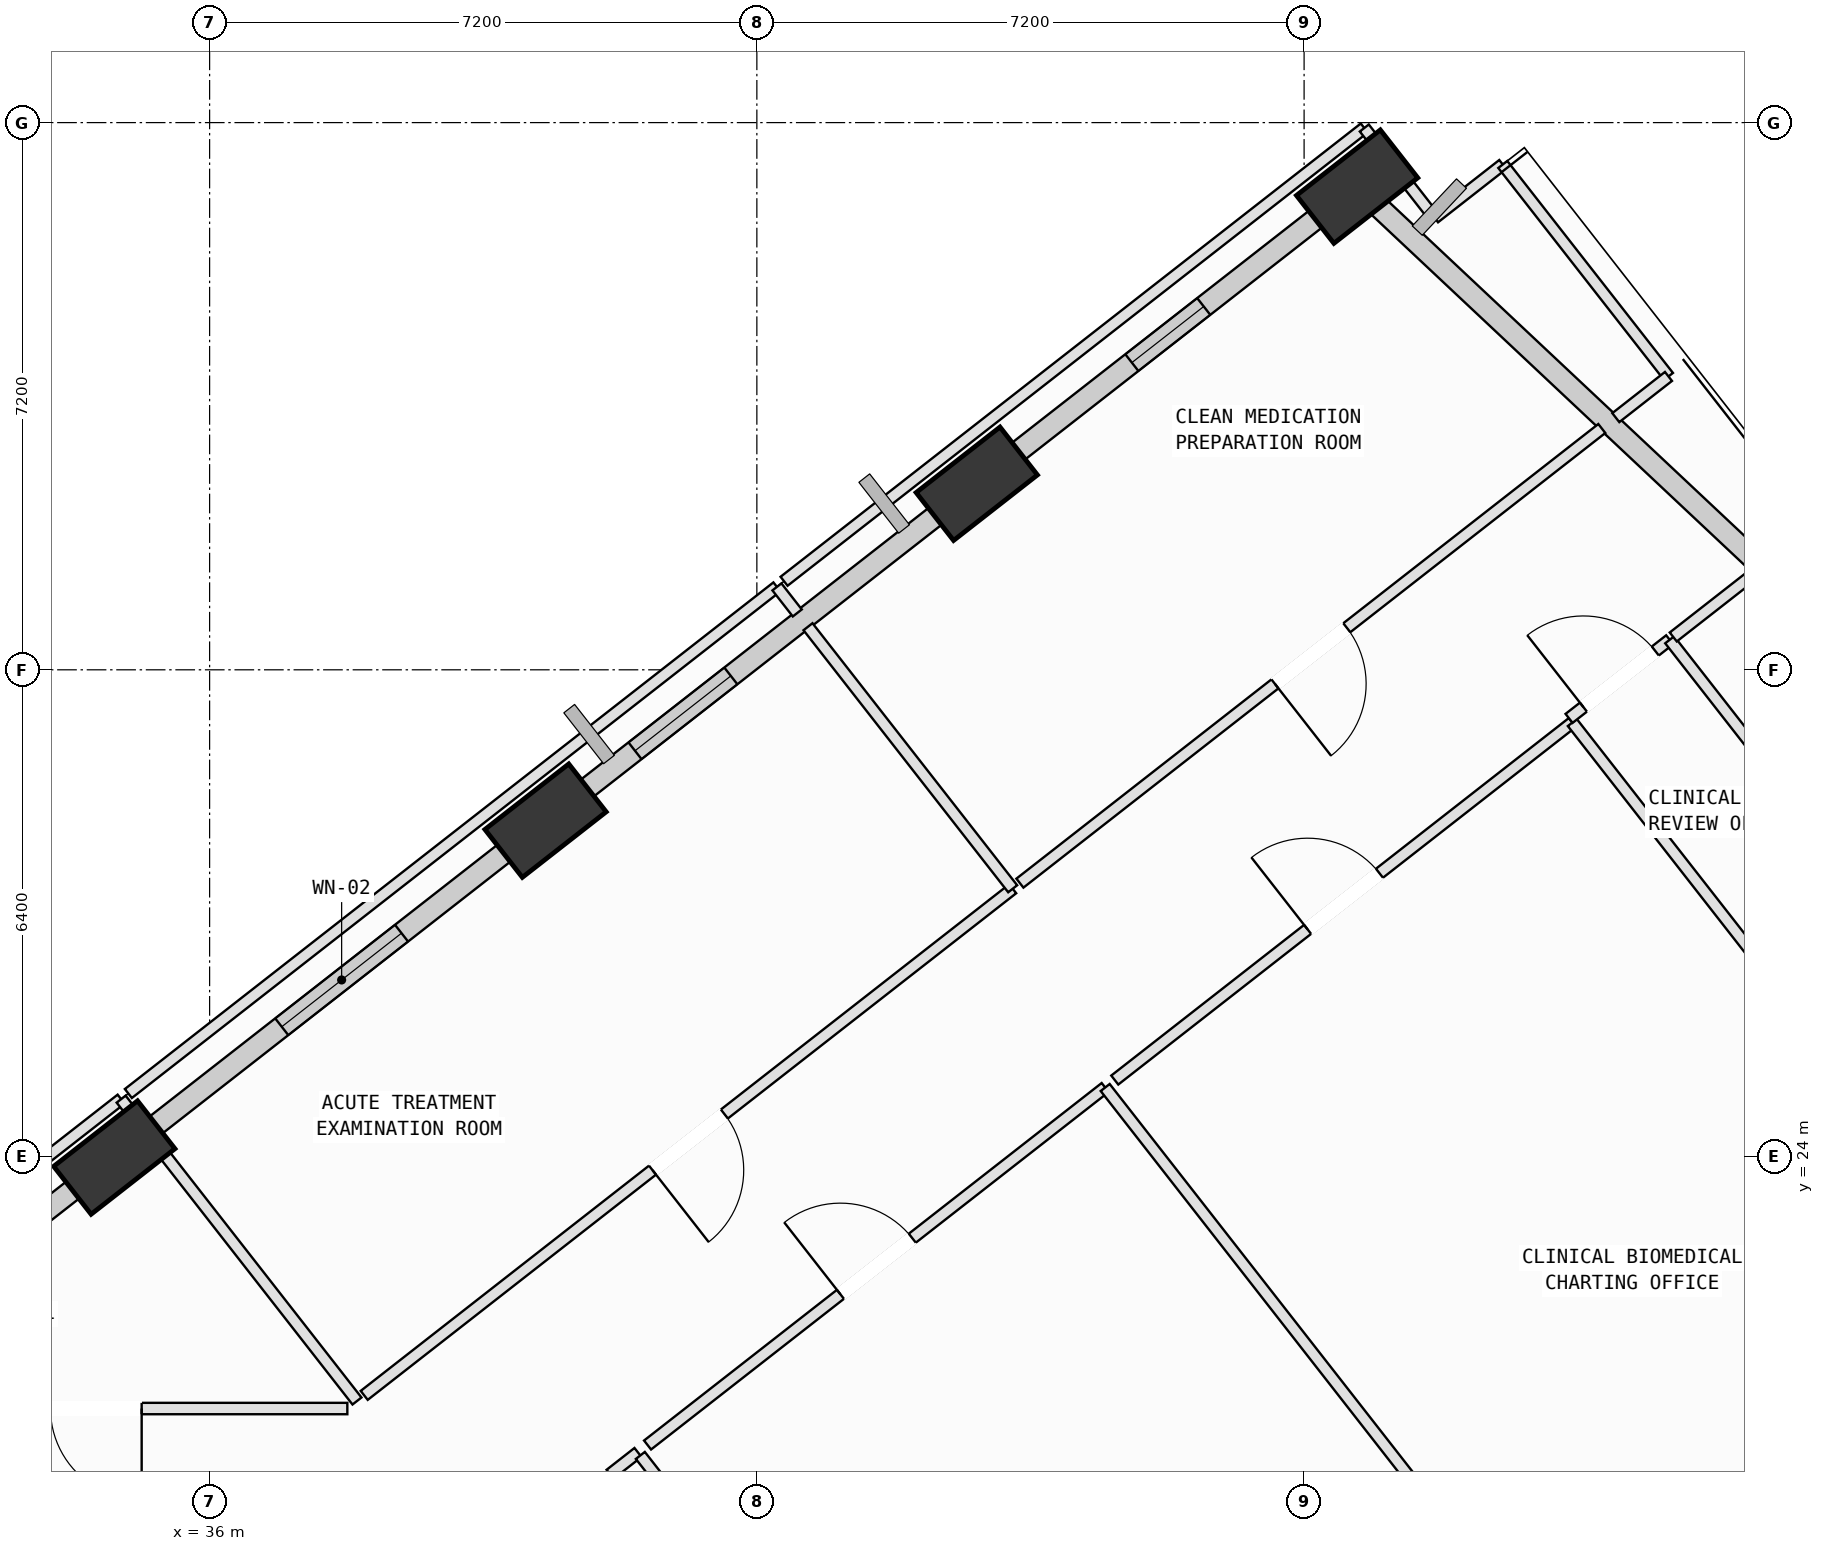
"""IFC4 building model, lengths in metres.
Left out: names, types, materials, properties, quantities, classifications, styles, units other than length and angle.
Written with IfcOpenShell. Run it as: python <this file> out.ifc"""

import sys

from ifc_helpers import new_model, si_unit, direction, frame, frame_2d, origin, origin_2d, place, context, subcontext, project, spatial, rectangle, extrude, element, fill, save


model = new_model("IFC4")
c1 = context("Model", 3, precision=1e-05, world=origin(), true_north=direction((0.0, 1.0)))
c2 = subcontext(c1, "Body", "Model", "MODEL_VIEW")
j1 = project(units=[si_unit("LENGTHUNIT", "METRE"), si_unit("PLANEANGLEUNIT", "RADIAN")], contexts=[c1])
p1 = place(None, origin())
s1 = spatial("IfcSite", under=j1, at=p1, CompositionType="ELEMENT")
p2 = place(p1, origin())
s2 = spatial("IfcBuilding", under=s1, at=p2, CompositionType="ELEMENT")
p3 = place(p2, frame((0.0, 0.0, 185.8)))
s3 = spatial("IfcBuildingStorey", under=s2, at=p3, CompositionType="ELEMENT", Elevation=185.8)
p4 = place(p3, frame((51.097, 36.758, 0.002), z_axis=(-0.049963487917, 0.071811103218, 0.99616605811), x_axis=(-0.296576647091, -0.953489085694, 0.05385959398)))
e1 = element("IfcColumn", 1, at=p4, inside=s3, PredefinedType="COLUMN", context=c2, shape_type="SweptSolid", body=[
    extrude(rectangle(XDim=1.4, YDim=0.8, at=origin_2d()), origin(), (0.0, 0.0, 1.0), 4.012),
])
p5 = place(p3, frame((46.094, 32.848, 0.002), z_axis=(-0.033780379415, 0.051402274092, 0.998106553523), x_axis=(-0.321055026499, -0.946303148336, 0.037868475128)))
e2 = element("IfcColumn", 2, at=p5, inside=s3, PredefinedType="COLUMN", context=c2, shape_type="SweptSolid", body=[
    extrude(rectangle(XDim=1.4, YDim=0.8, at=origin_2d()), origin(), (0.0, 0.0, 1.0), 4.004),
])
p6 = place(p3, frame((40.42, 28.415, 0.002), z_axis=(-0.01520389404, 0.02814857491, 0.999488118657), x_axis=(-0.400901487538, -0.91590941177, 0.019696363152)))
e3 = element("IfcColumn", 3, at=p6, inside=s3, PredefinedType="COLUMN", context=c2, shape_type="SweptSolid", body=[
    extrude(rectangle(XDim=1.4, YDim=0.8, at=origin_2d()), origin(), (0.0, 0.0, 1.0), 3.998),
])
p7 = place(p3, frame((34.746, 23.982, 0.002), z_axis=(0.003359952663, 0.004765023776, 0.999983002489), x_axis=(-0.99879049006, -0.049037451332, 0.003589614403)))
e4 = element("IfcColumn", 4, at=p7, inside=s3, PredefinedType="COLUMN", context=c2, shape_type="SweptSolid", body=[
    extrude(rectangle(XDim=1.4, YDim=0.8, at=origin_2d()), origin(), (0.0, 0.0, 1.0), 3.996),
])
p8 = place(p3, frame((51.333, 36.536, 0.0), z_axis=(0.0, 0.0, 1.0), x_axis=(0.728847654356, -0.684675906353, 0.0)))
e5 = element("IfcWall", 5, at=p8, inside=s3, PredefinedType="SOLIDWALL", context=c2, shape_type="SweptSolid", body=[
    extrude(rectangle(XDim=8.838, YDim=0.28, at=frame_2d((4.419, 0.0))), origin(), (0.0, 0.0, 1.0), 3.265),
])
p9 = place(p3, frame((46.481, 33.15, 0.0), z_axis=(0.0, 0.0, 1.0), x_axis=(0.788005197238, 0.615668587087, 0.0)))
e6 = element("IfcWall", 6, at=p9, inside=s3, PredefinedType="SOLIDWALL", context=c2, shape_type="SweptSolid", body=[
    extrude(rectangle(XDim=5.405, YDim=0.28, at=frame_2d((2.702, 0.0))), origin(), (0.0, 0.0, 1.0), 3.265),
])
p10 = place(p9, frame((2.098, 0.0, 0.75)))
e7 = element("IfcOpeningElement", 7, at=p10, cuts=e6, PredefinedType="OPENING", context=c2, shape_type="SweptSolid", body=[
    extrude(rectangle(XDim=1.2, YDim=1.75, at=frame_2d((0.6, 0.875))), frame((0.0, 0.15, 0.0), z_axis=(0.0, -1.0, 0.0), x_axis=(1.0, 0.0, 0.0)), (0.0, 0.0, 1.0), 0.3),
])
p11 = place(p3, frame((40.816, 28.725, 0.0), z_axis=(0.0, 0.0, 1.0), x_axis=(0.788020212459, 0.615649368355, 0.0)))
e8 = element("IfcWall", 8, at=p11, inside=s3, PredefinedType="SOLIDWALL", context=c2, shape_type="SweptSolid", body=[
    extrude(rectangle(XDim=6.226, YDim=0.28, at=frame_2d((3.113, 0.0))), origin(), (0.0, 0.0, 1.0), 3.065),
])
p12 = place(p11, frame((0.99, 0.0, 0.75)))
e9 = element("IfcOpeningElement", 9, at=p12, cuts=e8, PredefinedType="OPENING", context=c2, shape_type="SweptSolid", body=[
    extrude(rectangle(XDim=1.6, YDim=1.95, at=frame_2d((0.8, 0.975))), frame((0.0, 0.15, 0.0), z_axis=(0.0, -1.0, 0.0), x_axis=(1.0, 0.0, 0.0)), (0.0, 0.0, 1.0), 0.3),
])
p13 = place(p3, frame((35.146, 24.295, 0.0), z_axis=(0.0, 0.0, 1.0), x_axis=(0.787999939923, 0.615675315959, 0.0)))
e10 = element("IfcWall", 10, at=p13, inside=s3, PredefinedType="SOLIDWALL", context=c2, shape_type="SweptSolid", body=[
    extrude(rectangle(XDim=6.211, YDim=0.28, at=frame_2d((3.105, 0.0))), origin(), (0.0, 0.0, 1.0), 3.265),
])
p14 = place(p13, frame((2.288, 0.0, 0.75)))
e11 = element("IfcOpeningElement", 11, at=p14, cuts=e10, PredefinedType="OPENING", context=c2, shape_type="SweptSolid", body=[
    extrude(rectangle(XDim=2.0, YDim=1.95, at=frame_2d((1.0, 0.975))), frame((0.0, 0.15, 0.0), z_axis=(0.0, -1.0, 0.0), x_axis=(1.0, 0.0, 0.0)), (0.0, 0.0, 1.0), 0.3),
])
p15 = place(p3, frame((29.667, 20.014, 0.0), z_axis=(0.0, 0.0, 1.0), x_axis=(0.788002637329, 0.615671863547, 0.0)))
e12 = element("IfcWall", 12, at=p15, inside=s3, PredefinedType="SOLIDWALL", context=c2, shape_type="SweptSolid", body=[
    extrude(rectangle(XDim=5.96, YDim=0.28, at=frame_2d((2.98, 0.0))), origin(), (0.0, 0.0, 1.0), 3.265),
])
p16 = place(p3, frame((41.269, 19.815, 0.0), z_axis=(0.0, 0.0, 1.0), x_axis=(0.787571341055, 0.616223484418, 0.0)))
e13 = element("IfcWall", 13, at=p16, inside=s3, PredefinedType="PARTITIONING", context=c2, shape_type="SweptSolid", body=[
    extrude(rectangle(XDim=0.466, YDim=0.15, at=frame_2d((0.233, 0.0))), origin(), (0.0, 0.0, 1.0), 3.065),
])
p17 = place(p3, frame((41.667, 20.063, 0.0), z_axis=(0.0, 0.0, 1.0), x_axis=(0.615607368114, -0.788053023802, 0.0)))
e14 = element("IfcWall", 14, at=p17, inside=s3, PredefinedType="PARTITIONING", context=c2, shape_type="SweptSolid", body=[
    extrude(rectangle(XDim=13.436, YDim=0.15, at=frame_2d((6.718, 0.0))), origin(), (0.0, 0.0, 1.0), 3.78),
])
p18 = place(p3, frame((41.762, 20.2, 0.0), z_axis=(0.0, 0.0, 1.0), x_axis=(0.78801177859, 0.615660163404, 0.0)))
e15 = element("IfcWall", 15, at=p18, inside=s3, PredefinedType="PARTITIONING", context=c2, shape_type="SweptSolid", body=[
    extrude(rectangle(XDim=7.641, YDim=0.15, at=frame_2d((3.82, 0.0))), origin(), (0.0, 0.0, 1.0), 3.065),
])
p19 = place(p18, frame((3.22, 0.0, 0.0)))
e16 = element("IfcOpeningElement", 16, at=p19, cuts=e15, PredefinedType="OPENING", context=c2, shape_type="SweptSolid", body=[
    extrude(rectangle(XDim=1.2, YDim=2.15, at=frame_2d((0.6, 1.075))), frame((0.0, 0.085, 0.0), z_axis=(0.0, -1.0, 0.0), x_axis=(1.0, 0.0, 0.0)), (0.0, 0.0, 1.0), 0.17),
])
p20 = place(p3, frame((47.783, 24.904, 0.0), z_axis=(0.0, 0.0, 1.0), x_axis=(0.615629988963, -0.788035352436, 0.0)))
e17 = element("IfcWall", 17, at=p20, inside=s3, PredefinedType="PARTITIONING", context=c2, shape_type="SweptSolid", body=[
    extrude(rectangle(XDim=13.485, YDim=0.15, at=frame_2d((6.743, 0.0))), origin(), (0.0, 0.0, 1.0), 3.78),
])
p21 = place(p3, frame((47.909, 25.002, 0.0), z_axis=(0.0, 0.0, 1.0), x_axis=(0.787963326544, 0.615722174379, 0.0)))
e18 = element("IfcWall", 18, at=p21, inside=s3, PredefinedType="PARTITIONING", context=c2, shape_type="SweptSolid", body=[
    extrude(rectangle(XDim=7.64, YDim=0.15, at=frame_2d((3.82, 0.0))), origin(), (0.0, 0.0, 1.0), 3.78),
])
p22 = place(p21, frame((3.22, 0.0, 0.0)))
e19 = element("IfcOpeningElement", 19, at=p22, cuts=e18, PredefinedType="OPENING", context=c2, shape_type="SweptSolid", body=[
    extrude(rectangle(XDim=1.2, YDim=2.15, at=frame_2d((0.6, 1.075))), frame((0.0, 0.085, 0.0), z_axis=(0.0, -1.0, 0.0), x_axis=(1.0, 0.0, 0.0)), (0.0, 0.0, 1.0), 0.17),
])
p23 = place(p3, frame((53.929, 29.706, 0.0), z_axis=(0.0, 0.0, 1.0), x_axis=(0.61569405519, -0.787985298342, 0.0)))
e20 = element("IfcWall", 20, at=p23, inside=s3, PredefinedType="PARTITIONING", context=c2, shape_type="SweptSolid", body=[
    extrude(rectangle(XDim=13.83, YDim=0.15, at=frame_2d((6.915, 0.0))), origin(), (0.0, 0.0, 1.0), 3.78),
])
p24 = place(p3, frame((29.364, 20.476, 0.0), z_axis=(0.0, 0.0, 1.0), x_axis=(0.788027038921, 0.615640630505, 0.0)))
e21 = element("IfcWall", 21, at=p24, inside=s3, PredefinedType="PARTITIONING", context=c2, shape_type="SweptSolid", body=[
    extrude(rectangle(XDim=6.944, YDim=0.15, at=frame_2d((3.472, 0.0))), origin(), (0.0, 0.0, 1.0), 3.78),
])
p25 = place(p3, frame((34.836, 24.751, 0.0), z_axis=(0.0, 0.0, 1.0), x_axis=(0.615763745793, -0.787930840472, 0.0)))
e22 = element("IfcWall", 22, at=p25, inside=s3, PredefinedType="PARTITIONING", context=c2, shape_type="SweptSolid", body=[
    extrude(rectangle(XDim=0.435, YDim=0.15, at=frame_2d((0.218, 0.0))), origin(), (0.0, 0.0, 1.0), 3.78),
])
p26 = place(p3, frame((35.246, 24.227, 0.0), z_axis=(0.0, 0.0, 1.0), x_axis=(0.615519498699, -0.78812165731, 0.0)))
e23 = element("IfcWall", 23, at=p26, inside=s3, PredefinedType="PARTITIONING", context=c2, shape_type="SweptSolid", body=[
    extrude(rectangle(XDim=4.375, YDim=0.15, at=frame_2d((2.188, 0.0))), origin(), (0.0, 0.0, 1.0), 3.78),
])
p27 = place(p3, frame((37.812, 20.68, 0.0), z_axis=(0.0, 0.0, 1.0), x_axis=(-1.0, 0.0, 0.0)))
e24 = element("IfcWall", 24, at=p27, inside=s3, PredefinedType="PARTITIONING", context=c2, shape_type="SweptSolid", body=[
    extrude(rectangle(XDim=6.612, YDim=0.15, at=frame_2d((3.306, 0.0))), origin(), (0.0, 0.0, 1.0), 3.415),
])
p28 = place(p27, frame((2.706, 0.0, 0.0)))
e25 = element("IfcOpeningElement", 25, at=p28, cuts=e24, PredefinedType="OPENING", context=c2, shape_type="SweptSolid", body=[
    extrude(rectangle(XDim=1.2, YDim=2.15, at=frame_2d((0.6, 1.075))), frame((0.0, 0.085, 0.0), z_axis=(0.0, -1.0, 0.0), x_axis=(1.0, 0.0, 0.0)), (0.0, 0.0, 1.0), 0.17),
])
p29 = place(p3, frame((46.566, 27.519, 0.0), z_axis=(0.0, 0.0, 1.0), x_axis=(-0.788006255186, -0.615667232998, 0.0)))
e26 = element("IfcWall", 26, at=p29, inside=s3, PredefinedType="PARTITIONING", context=c2, shape_type="SweptSolid", body=[
    extrude(rectangle(XDim=10.827, YDim=0.15, at=frame_2d((5.414, 0.0))), origin(), (0.0, 0.0, 1.0), 3.065),
])
p30 = place(p29, frame((4.814, 0.0, 0.0)))
e27 = element("IfcOpeningElement", 27, at=p30, cuts=e26, PredefinedType="OPENING", context=c2, shape_type="SweptSolid", body=[
    extrude(rectangle(XDim=1.2, YDim=2.15, at=frame_2d((0.6, 1.075))), frame((0.0, 0.085, 0.0), z_axis=(0.0, -1.0, 0.0), x_axis=(1.0, 0.0, 0.0)), (0.0, 0.0, 1.0), 0.17),
])
p31 = place(p3, frame((34.931, 24.825, 0.0), z_axis=(0.0, 0.0, 1.0), x_axis=(0.788048984309, 0.615612539127, 0.0)))
e28 = element("IfcWall", 28, at=p31, inside=s3, PredefinedType="PARTITIONING", context=c2, shape_type="SweptSolid", body=[
    extrude(rectangle(XDim=10.828, YDim=0.15, at=frame_2d((5.414, 0.0))), origin(), (0.0, 0.0, 1.0), 3.265),
])
p32 = place(p3, frame((43.464, 31.491, 0.0), z_axis=(0.0, 0.0, 1.0), x_axis=(0.615415398102, -0.788202948344, 0.0)))
e29 = element("IfcWall", 29, at=p32, inside=s3, PredefinedType="PARTITIONING", context=c2, shape_type="SweptSolid", body=[
    extrude(rectangle(XDim=0.435, YDim=0.15, at=frame_2d((0.218, 0.0))), origin(), (0.0, 0.0, 1.0), 3.78),
])
p33 = place(p3, frame((43.873, 30.967, 0.0), z_axis=(0.0, 0.0, 1.0), x_axis=(0.615519498699, -0.78812165731, 0.0)))
e30 = element("IfcWall", 30, at=p33, inside=s3, PredefinedType="PARTITIONING", context=c2, shape_type="SweptSolid", body=[
    extrude(rectangle(XDim=4.375, YDim=0.15, at=frame_2d((2.188, 0.0))), origin(), (0.0, 0.0, 1.0), 3.78),
])
p34 = place(p3, frame((52.116, 36.347, 0.0), z_axis=(0.0, 0.0, 1.0), x_axis=(0.787758034876, 0.61598480378, 0.0)))
e31 = element("IfcWall", 31, at=p34, inside=s3, PredefinedType="PARTITIONING", context=c2, shape_type="SweptSolid", body=[
    extrude(rectangle(XDim=1.14, YDim=0.15, at=frame_2d((0.57, 0.0))), origin(), (0.0, 0.0, 1.0), 3.78),
])
p35 = place(p3, frame((53.014, 37.049, 0.0), z_axis=(0.0, 0.0, 1.0), x_axis=(0.615858149748, -0.787857055175, 0.0)))
e32 = element("IfcWall", 32, at=p35, inside=s3, PredefinedType="PARTITIONING", context=c2, shape_type="SweptSolid", body=[
    extrude(rectangle(XDim=3.54, YDim=0.15, at=frame_2d((1.77, 0.0))), origin(), (0.0, 0.0, 1.0), 3.78),
])
p36 = place(p3, frame((55.194, 34.26, 0.0), z_axis=(0.0, 0.0, 1.0), x_axis=(-0.787750859678, -0.615993979741, 0.0)))
e33 = element("IfcWall", 33, at=p36, inside=s3, PredefinedType="PARTITIONING", context=c2, shape_type="SweptSolid", body=[
    extrude(rectangle(XDim=0.88, YDim=0.15, at=frame_2d((0.44, 0.0))), origin(), (0.0, 0.0, 1.0), 3.78),
])
p37 = place(p3, frame((54.317, 33.575, 0.0), z_axis=(0.0, 0.0, 1.0), x_axis=(-0.787990467188, -0.615687439875, 0.0)))
e34 = element("IfcWall", 34, at=p37, inside=s3, PredefinedType="PARTITIONING", context=c2, shape_type="SweptSolid", body=[
    extrude(rectangle(XDim=9.716, YDim=0.15, at=frame_2d((4.858, 0.0))), origin(), (0.0, 0.0, 1.0), 3.78),
])
p38 = place(p37, frame((4.258, 0.0, 0.0)))
e35 = element("IfcOpeningElement", 35, at=p38, cuts=e34, PredefinedType="OPENING", context=c2, shape_type="SweptSolid", body=[
    extrude(rectangle(XDim=1.2, YDim=2.15, at=frame_2d((0.6, 1.075))), frame((0.0, 0.085, 0.0), z_axis=(0.0, -1.0, 0.0), x_axis=(1.0, 0.0, 0.0)), (0.0, 0.0, 1.0), 0.17),
])
p39 = place(p3, frame((43.558, 31.565, 0.0), z_axis=(0.0, 0.0, 1.0), x_axis=(0.788013675398, 0.615657735586, 0.0)))
e36 = element("IfcWall", 36, at=p39, inside=s3, PredefinedType="PARTITIONING", context=c2, shape_type="SweptSolid", body=[
    extrude(rectangle(XDim=9.688, YDim=0.15, at=frame_2d((4.844, 0.0))), origin(), (0.0, 0.0, 1.0), 3.065),
])
p40 = place(p3, frame((51.192, 37.529, 0.0), z_axis=(0.0, 0.0, 1.0), x_axis=(0.615865045624, -0.787851664705, 0.0)))
e37 = element("IfcWall", 37, at=p40, inside=s3, PredefinedType="PARTITIONING", context=c2, shape_type="SweptSolid", body=[
    extrude(rectangle(XDim=1.5, YDim=0.15, at=frame_2d((0.75, 0.0))), origin(), (0.0, 0.0, 1.0), 3.265),
])
p41 = place(p3, frame((53.886, 29.761, 0.0), z_axis=(0.0, 0.0, 1.0), x_axis=(0.788145543456, 0.615488913247, 0.0)))
e38 = element("IfcWall", 38, at=p41, inside=s3, PredefinedType="PARTITIONING", context=c2, shape_type="SweptSolid", body=[
    extrude(rectangle(XDim=1.68, YDim=0.15, at=frame_2d((0.84, 0.0))), origin(), (0.0, 0.0, 1.0), 3.78),
])
p42 = place(p41, frame((0.24, 0.0, 0.0)))
e39 = element("IfcOpeningElement", 39, at=p42, cuts=e38, PredefinedType="OPENING", context=c2, shape_type="SweptSolid", body=[
    extrude(rectangle(XDim=1.2, YDim=2.15, at=frame_2d((0.6, 1.075))), frame((0.0, 0.085, 0.0), z_axis=(0.0, -1.0, 0.0), x_axis=(1.0, 0.0, 0.0)), (0.0, 0.0, 1.0), 0.17),
])
p43 = place(p3, frame((55.21, 30.795, 0.0), z_axis=(0.0, 0.0, 1.0), x_axis=(0.615684921199, -0.787992435122, 0.0)))
e40 = element("IfcWall", 40, at=p43, inside=s3, PredefinedType="PARTITIONING", context=c2, shape_type="SweptSolid", body=[
    extrude(rectangle(XDim=11.821, YDim=0.15, at=frame_2d((5.911, 0.0))), origin(), (0.0, 0.0, 1.0), 3.78),
])
p44 = place(p43, frame((5.481, 0.0, 0.0)))
e41 = element("IfcOpeningElement", 41, at=p44, cuts=e40, PredefinedType="OPENING", context=c2, shape_type="SweptSolid", body=[
    extrude(rectangle(XDim=0.86, YDim=2.06, at=frame_2d((0.43, 1.03))), frame((0.0, 0.085, 0.0), z_axis=(0.0, -1.0, 0.0), x_axis=(1.0, 0.0, 0.0)), (0.0, 0.0, 1.0), 0.17),
])
p45 = place(p3, frame((55.257, 30.832, 0.0), z_axis=(0.0, 0.0, 1.0), x_axis=(0.787816586206, 0.615909917519, 0.0)))
e42 = element("IfcWall", 42, at=p45, inside=s3, PredefinedType="PARTITIONING", context=c2, shape_type="SweptSolid", body=[
    extrude(rectangle(XDim=1.372, YDim=0.15, at=frame_2d((0.686, 0.0))), origin(), (0.0, 0.0, 1.0), 3.78),
])
p46 = place(p10, origin())
e43 = element("IfcWindow", 43, at=p46, inside=s3, PartitioningType="SINGLE_PANEL", PredefinedType="WINDOW", context=c2, shape_type="SweptSolid", body=[
    extrude(rectangle(XDim=1.2, YDim=1.75, at=frame_2d((0.6, 0.875))), frame((0.0, 0.03, 0.0), z_axis=(0.0, -1.0, 0.0), x_axis=(1.0, 0.0, 0.0)), (0.0, 0.0, 1.0), 0.06),
])
fill(e7, e43)
p47 = place(p12, origin())
e44 = element("IfcWindow", 44, at=p47, inside=s3, PartitioningType="SINGLE_PANEL", PredefinedType="WINDOW", context=c2, shape_type="SweptSolid", body=[
    extrude(rectangle(XDim=1.6, YDim=1.95, at=frame_2d((0.8, 0.975))), frame((0.0, 0.03, 0.0), z_axis=(0.0, -1.0, 0.0), x_axis=(1.0, 0.0, 0.0)), (0.0, 0.0, 1.0), 0.06),
])
fill(e9, e44)
p48 = place(p14, origin())
e45 = element("IfcWindow", 45, at=p48, inside=s3, PartitioningType="SINGLE_PANEL", PredefinedType="WINDOW", context=c2, shape_type="SweptSolid", body=[
    extrude(rectangle(XDim=2.0, YDim=1.95, at=frame_2d((1.0, 0.975))), frame((0.0, 0.03, 0.0), z_axis=(0.0, -1.0, 0.0), x_axis=(1.0, 0.0, 0.0)), (0.0, 0.0, 1.0), 0.06),
])
fill(e11, e45)
p49 = place(p19, origin())
e46 = element("IfcDoor", 46, at=p49, inside=s3, OperationType="SINGLE_SWING_LEFT", PredefinedType="DOOR", context=c2, shape_type="SweptSolid", body=[
    extrude(rectangle(XDim=1.2, YDim=2.15, at=frame_2d((0.6, 1.075))), frame((0.0, 0.025, 0.0), z_axis=(0.0, -1.0, 0.0), x_axis=(1.0, 0.0, 0.0)), (0.0, 0.0, 1.0), 0.05),
])
fill(e16, e46)
p50 = place(p22, origin())
e47 = element("IfcDoor", 47, at=p50, inside=s3, OperationType="SINGLE_SWING_LEFT", PredefinedType="DOOR", context=c2, shape_type="SweptSolid", body=[
    extrude(rectangle(XDim=1.2, YDim=2.15, at=frame_2d((0.6, 1.075))), frame((0.0, 0.025, 0.0), z_axis=(0.0, -1.0, 0.0), x_axis=(1.0, 0.0, 0.0)), (0.0, 0.0, 1.0), 0.05),
])
fill(e19, e47)
p51 = place(p28, origin())
e48 = element("IfcDoor", 48, at=p51, inside=s3, OperationType="SINGLE_SWING_LEFT", PredefinedType="DOOR", context=c2, shape_type="SweptSolid", body=[
    extrude(rectangle(XDim=1.2, YDim=2.15, at=frame_2d((0.6, 1.075))), frame((0.0, 0.025, 0.0), z_axis=(0.0, -1.0, 0.0), x_axis=(1.0, 0.0, 0.0)), (0.0, 0.0, 1.0), 0.05),
])
fill(e25, e48)
p52 = place(p30, origin())
e49 = element("IfcDoor", 49, at=p52, inside=s3, OperationType="SINGLE_SWING_RIGHT", PredefinedType="DOOR", context=c2, shape_type="SweptSolid", body=[
    extrude(rectangle(XDim=1.2, YDim=2.15, at=frame_2d((0.6, 1.075))), frame((0.0, 0.025, 0.0), z_axis=(0.0, -1.0, 0.0), x_axis=(1.0, 0.0, 0.0)), (0.0, 0.0, 1.0), 0.05),
])
fill(e27, e49)
p53 = place(p38, origin())
e50 = element("IfcDoor", 50, at=p53, inside=s3, OperationType="SINGLE_SWING_RIGHT", PredefinedType="DOOR", context=c2, shape_type="SweptSolid", body=[
    extrude(rectangle(XDim=1.2, YDim=2.15, at=frame_2d((0.6, 1.075))), frame((0.0, 0.025, 0.0), z_axis=(0.0, -1.0, 0.0), x_axis=(1.0, 0.0, 0.0)), (0.0, 0.0, 1.0), 0.05),
])
fill(e35, e50)
p54 = place(p42, origin())
e51 = element("IfcDoor", 51, at=p54, inside=s3, OperationType="SINGLE_SWING_LEFT", PredefinedType="DOOR", context=c2, shape_type="SweptSolid", body=[
    extrude(rectangle(XDim=1.2, YDim=2.15, at=frame_2d((0.6, 1.075))), frame((0.0, 0.025, 0.0), z_axis=(0.0, -1.0, 0.0), x_axis=(1.0, 0.0, 0.0)), (0.0, 0.0, 1.0), 0.05),
])
fill(e39, e51)
save(model, sys.argv[1])
